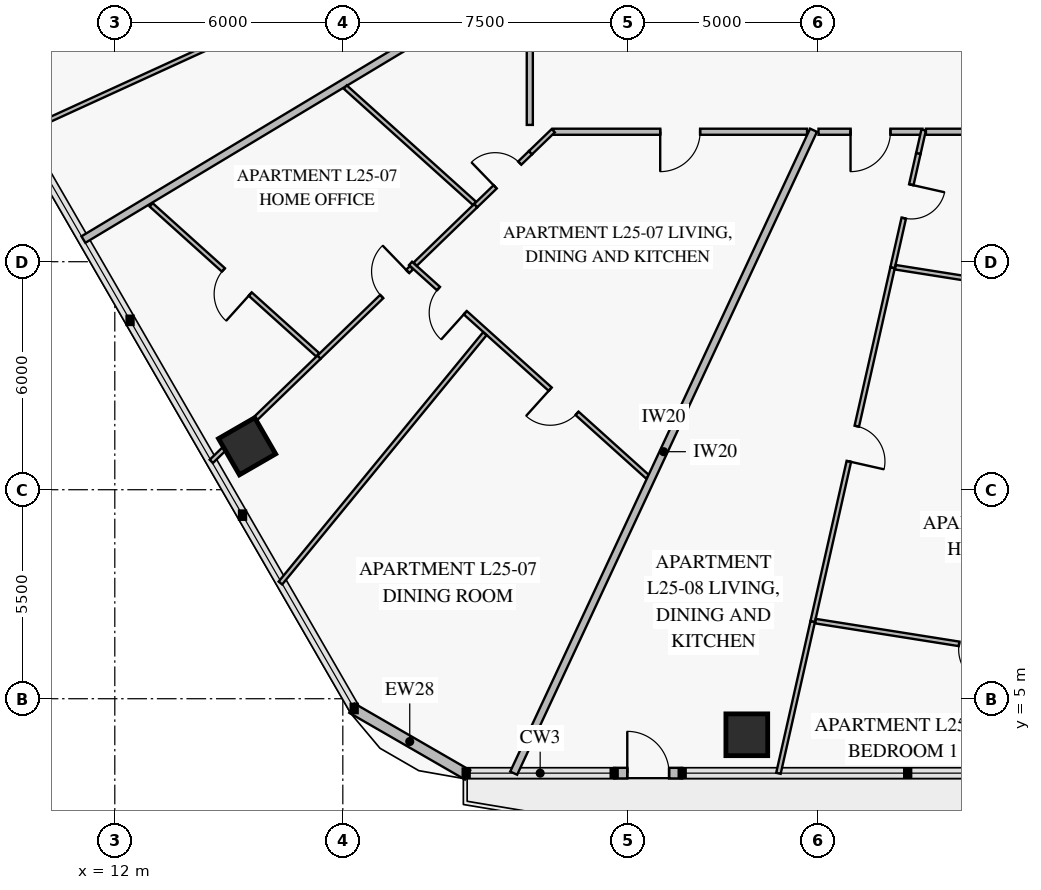
"""IFC4 building model, lengths in metres.
Left out: names, types, materials, properties, quantities, classifications, styles, units other than length and angle.
Written with IfcOpenShell. Run it as: python <this file> out.ifc"""

import sys

from ifc_helpers import new_model, si_unit, direction, frame, frame_2d, origin, origin_2d, place, context, subcontext, project, spatial, rectangle, extrude, element, fill, save


model = new_model("IFC4")
c1 = context("Model", 3, precision=1e-05, world=origin(), true_north=direction((0.0, 1.0)))
c2 = subcontext(c1, "Body", "Model", "MODEL_VIEW")
j1 = project(units=[si_unit("LENGTHUNIT", "METRE"), si_unit("PLANEANGLEUNIT", "RADIAN")], contexts=[c1])
p1 = place(None, origin())
s1 = spatial("IfcSite", under=j1, at=p1, CompositionType="ELEMENT")
p2 = place(p1, origin())
s2 = spatial("IfcBuilding", under=s1, at=p2, CompositionType="ELEMENT")
p3 = place(p2, frame((0.0, 0.0, 103.8)))
s3 = spatial("IfcBuildingStorey", under=s2, at=p3, CompositionType="ELEMENT", Elevation=103.8)
for number, where, z_axis, x_axis in (
    (1, (15.481, 11.643, 0.0), (0.0, 0.0, 1.0), (0.5, -0.866, 0.0)),
    (2, (28.63, 4.052, 0.0), (0.0, 0.0, 1.0), (1.0, 0.0, 0.0)),
):
    element("IfcColumn", number, at=place(p3, frame(where, z_axis=z_axis, x_axis=x_axis)), inside=s3, PredefinedType="COLUMN", context=c2, shape_type="SweptSolid", body=[
        extrude(rectangle(XDim=1.1, YDim=1.1, at=origin_2d()), origin(), (0.0, 0.0, 1.0), 3.55),
    ])
p4 = place(p3, frame((26.93, 3.042, 0.0), z_axis=(0.0, 0.0, 1.0), x_axis=(-1.0, 0.0, 0.0)))
e3 = element("IfcWall", 3, at=p4, inside=s3, PredefinedType="SOLIDWALL", context=c2, shape_type="SweptSolid", body=[
    extrude(rectangle(XDim=1.79, YDim=0.28, at=frame_2d((0.895, 0.0))), origin(), (0.0, 0.0, 1.0), 3.55),
])
p5 = place(p4, frame((0.345, 0.0, 0.0)))
e4 = element("IfcOpeningElement", 4, at=p5, cuts=e3, PredefinedType="OPENING", context=c2, shape_type="SweptSolid", body=[
    extrude(rectangle(XDim=1.1, YDim=2.2, at=frame_2d((0.55, 1.1))), frame((0.0, 0.152, 0.0), z_axis=(0.0, -1.0, 0.0), x_axis=(1.0, 0.0, 0.0)), (0.0, 0.0, 1.0), 0.304),
])
p6 = place(p3, frame((21.283, 2.994, 0.0), z_axis=(0.0, 0.0, 1.0), x_axis=(-0.866007452331, 0.500031091541, 0.0)))
e5 = element("IfcWall", 5, at=p6, inside=s3, PredefinedType="SOLIDWALL", context=c2, shape_type="SweptSolid", body=[
    extrude(rectangle(XDim=3.515, YDim=0.28, at=frame_2d((1.757, 0.0))), origin(), (0.0, 0.0, 1.0), 3.55),
])
p7 = place(p3, frame((19.781, 16.455, 0.0), z_axis=(0.0, 0.0, 1.0), x_axis=(0.743143681273, -0.669131877125, 0.0)))
e6 = element("IfcWall", 6, at=p7, inside=s3, PredefinedType="PARTITIONING", context=c2, shape_type="SweptSolid", body=[
    extrude(rectangle(XDim=8.392, YDim=0.12, at=frame_2d((4.196, 0.0))), origin(), (0.0, 0.0, 1.0), 2.85),
])
p8 = place(p7, frame((0.989, 0.0, 0.0)))
e7 = element("IfcOpeningElement", 7, at=p8, cuts=e6, PredefinedType="OPENING", context=c2, shape_type="SweptSolid", body=[
    extrude(rectangle(XDim=0.95, YDim=2.1, at=frame_2d((0.475, 1.05))), frame((0.0, 0.072, 0.0), z_axis=(0.0, -1.0, 0.0), x_axis=(1.0, 0.0, 0.0)), (0.0, 0.0, 1.0), 0.144),
])
p9 = place(p7, frame((4.945, 0.0, 0.0)))
e8 = element("IfcOpeningElement", 8, at=p9, cuts=e6, PredefinedType="OPENING", context=c2, shape_type="SweptSolid", body=[
    extrude(rectangle(XDim=0.95, YDim=2.1, at=frame_2d((0.475, 1.05))), frame((0.0, 0.072, 0.0), z_axis=(0.0, -1.0, 0.0), x_axis=(1.0, 0.0, 0.0)), (0.0, 0.0, 1.0), 0.144),
])
p10 = place(p3, frame((22.938, 19.368, 0.0), z_axis=(0.0, 0.0, 1.0), x_axis=(-0.718812006411, -0.695204501884, 0.0)))
e9 = element("IfcWall", 9, at=p10, inside=s3, PredefinedType="PARTITIONING", context=c2, shape_type="SweptSolid", body=[
    extrude(rectangle(XDim=2.006, YDim=0.12, at=frame_2d((1.003, 0.0))), origin(), (0.0, 0.0, 1.0), 3.55),
])
p11 = place(p10, frame((0.393, 0.0, 0.0)))
e10 = element("IfcOpeningElement", 10, at=p11, cuts=e9, PredefinedType="OPENING", context=c2, shape_type="SweptSolid", body=[
    extrude(rectangle(XDim=0.9, YDim=2.1, at=frame_2d((0.45, 1.05))), frame((0.0, 0.072, 0.0), z_axis=(0.0, -1.0, 0.0), x_axis=(1.0, 0.0, 0.0)), (0.0, 0.0, 1.0), 0.144),
])
p12 = place(p3, frame((21.496, 17.974, 0.0), z_axis=(0.0, 0.0, 1.0), x_axis=(-0.718868898455, -0.695145673103, 0.0)))
e11 = element("IfcWall", 11, at=p12, inside=s3, PredefinedType="PARTITIONING", context=c2, shape_type="SweptSolid", body=[
    extrude(rectangle(XDim=2.213, YDim=0.12, at=frame_2d((1.106, 0.0))), origin(), (0.0, 0.0, 1.0), 3.1),
])
p13 = place(p3, frame((19.807, 16.341, 0.0), z_axis=(0.0, 0.0, 1.0), x_axis=(-0.718831046799, -0.69518481439, 0.0)))
e12 = element("IfcWall", 12, at=p13, inside=s3, PredefinedType="PARTITIONING", context=c2, shape_type="SweptSolid", body=[
    extrude(rectangle(XDim=3.386, YDim=0.12, at=frame_2d((1.693, 0.0))), origin(), (0.0, 0.0, 1.0), 3.55),
])
p14 = place(p13, frame((0.14, 0.0, 0.0)))
e13 = element("IfcOpeningElement", 13, at=p14, cuts=e12, PredefinedType="OPENING", context=c2, shape_type="SweptSolid", body=[
    extrude(rectangle(XDim=0.95, YDim=2.1, at=frame_2d((0.475, 1.05))), frame((0.0, 0.072, 0.0), z_axis=(0.0, -1.0, 0.0), x_axis=(1.0, 0.0, 0.0)), (0.0, 0.0, 1.0), 0.144),
])
p15 = place(p3, frame((12.957, 17.996, 0.0), z_axis=(0.0, 0.0, 1.0), x_axis=(0.743162407379, -0.669111079163, 0.0)))
e14 = element("IfcWall", 14, at=p15, inside=s3, PredefinedType="PARTITIONING", context=c2, shape_type="SweptSolid", body=[
    extrude(rectangle(XDim=5.898, YDim=0.12, at=frame_2d((2.949, 0.0))), origin(), (0.0, 0.0, 1.0), 3.55),
])
p16 = place(p15, frame((2.558, 0.0, 0.0)))
e15 = element("IfcOpeningElement", 15, at=p16, cuts=e14, PredefinedType="OPENING", context=c2, shape_type="SweptSolid", body=[
    extrude(rectangle(XDim=0.95, YDim=2.1, at=frame_2d((0.475, 1.05))), frame((0.0, 0.072, 0.0), z_axis=(0.0, -1.0, 0.0), x_axis=(1.0, 0.0, 0.0)), (0.0, 0.0, 1.0), 0.144),
])
p17 = place(p3, frame((23.537, 19.92, 0.0), z_axis=(0.0, 0.0, 1.0), x_axis=(1.0, 0.0, 0.0)))
e16 = element("IfcWall", 16, at=p17, inside=s3, PredefinedType="PARTITIONING", context=c2, shape_type="SweptSolid", body=[
    extrude(rectangle(XDim=6.679, YDim=0.16, at=frame_2d((3.339, 0.0))), origin(), (0.0, 0.0, 1.0), 2.85),
])
p18 = place(p17, frame((2.814, 0.0, 0.0)))
e17 = element("IfcOpeningElement", 17, at=p18, cuts=e16, PredefinedType="OPENING", context=c2, shape_type="SweptSolid", body=[
    extrude(rectangle(XDim=1.05, YDim=2.15, at=frame_2d((0.525, 1.075))), frame((0.0, 0.092, 0.0), z_axis=(0.0, -1.0, 0.0), x_axis=(1.0, 0.0, 0.0)), (0.0, 0.0, 1.0), 0.184),
])
p19 = place(p3, frame((33.145, 19.35, 0.0), z_axis=(0.0, 0.0, 1.0), x_axis=(-0.220163710026, -0.975462936655, 0.0)))
e18 = element("IfcWall", 18, at=p19, inside=s3, PredefinedType="PARTITIONING", context=c2, shape_type="SweptSolid", body=[
    extrude(rectangle(XDim=3.085, YDim=0.12, at=frame_2d((1.542, 0.0))), origin(), (0.0, 0.0, 1.0), 3.55),
])
p20 = place(p19, frame((0.846, 0.0, 0.0)))
e19 = element("IfcOpeningElement", 19, at=p20, cuts=e18, PredefinedType="OPENING", context=c2, shape_type="SweptSolid", body=[
    extrude(rectangle(XDim=0.9, YDim=2.1, at=frame_2d((0.45, 1.05))), frame((0.0, 0.072, 0.0), z_axis=(0.0, -1.0, 0.0), x_axis=(1.0, 0.0, 0.0)), (0.0, 0.0, 1.0), 0.144),
])
p21 = place(p3, frame((32.465, 16.341, 0.0), z_axis=(0.0, 0.0, 1.0), x_axis=(-0.220183949045, -0.975458368452, 0.0)))
e20 = element("IfcWall", 20, at=p21, inside=s3, PredefinedType="PARTITIONING", context=c2, shape_type="SweptSolid", body=[
    extrude(rectangle(XDim=9.547, YDim=0.12, at=frame_2d((4.773, 0.0))), origin(), (0.0, 0.0, 1.0), 3.1),
])
p22 = place(p21, frame((4.273, 0.0, 0.0)))
e21 = element("IfcOpeningElement", 21, at=p22, cuts=e20, PredefinedType="OPENING", context=c2, shape_type="SweptSolid", body=[
    extrude(rectangle(XDim=0.95, YDim=2.1, at=frame_2d((0.475, 1.05))), frame((0.0, 0.072, 0.0), z_axis=(0.0, -1.0, 0.0), x_axis=(1.0, 0.0, 0.0)), (0.0, 0.0, 1.0), 0.144),
])
p23 = place(p3, frame((30.436, 7.042, 0.0), z_axis=(0.0, 0.0, 1.0), x_axis=(0.987688614877, -0.156432733283, 0.0)))
e22 = element("IfcWall", 22, at=p23, inside=s3, PredefinedType="PARTITIONING", context=c2, shape_type="SweptSolid", body=[
    extrude(rectangle(XDim=8.772, YDim=0.12, at=frame_2d((4.386, 0.0))), origin(), (0.0, 0.0, 1.0), 3.55),
])
p24 = place(p23, frame((3.827, 0.0, 0.0)))
e23 = element("IfcOpeningElement", 23, at=p24, cuts=e22, PredefinedType="OPENING", context=c2, shape_type="SweptSolid", body=[
    extrude(rectangle(XDim=0.95, YDim=2.1, at=frame_2d((0.475, 1.05))), frame((0.0, 0.072, 0.0), z_axis=(0.0, -1.0, 0.0), x_axis=(1.0, 0.0, 0.0)), (0.0, 0.0, 1.0), 0.144),
])
p25 = place(p3, frame((30.517, 19.92, 0.0), z_axis=(0.0, 0.0, 1.0), x_axis=(1.0, 0.0, 0.0)))
e24 = element("IfcWall", 24, at=p25, inside=s3, PredefinedType="PARTITIONING", context=c2, shape_type="SweptSolid", body=[
    extrude(rectangle(XDim=2.736, YDim=0.16, at=frame_2d((1.368, 0.0))), origin(), (0.0, 0.0, 1.0), 2.85),
])
p26 = place(p25, frame((0.843, 0.0, 0.0)))
e25 = element("IfcOpeningElement", 25, at=p26, cuts=e24, PredefinedType="OPENING", context=c2, shape_type="SweptSolid", body=[
    extrude(rectangle(XDim=1.05, YDim=2.15, at=frame_2d((0.525, 1.075))), frame((0.0, 0.092, 0.0), z_axis=(0.0, -1.0, 0.0), x_axis=(1.0, 0.0, 0.0)), (0.0, 0.0, 1.0), 0.184),
])
p27 = place(p3, frame((19.35, 24.384, 0.0), z_axis=(0.0, 0.0, 1.0), x_axis=(-0.909372754927, -0.415982202259, 0.0)))
e26 = element("IfcWall", 26, at=p27, inside=s3, PredefinedType="PARTITIONING", context=c2, shape_type="SweptSolid", body=[
    extrude(rectangle(XDim=10.79, YDim=0.12, at=frame_2d((5.395, 0.0))), origin(), (0.0, 0.0, 1.0), 2.8),
])
p28 = place(p3, frame((22.96, 24.165, 0.0), z_axis=(0.0, 0.0, 1.0), x_axis=(-0.857163744899, -0.515043992714, 0.0)))
e27 = element("IfcWall", 27, at=p28, inside=s3, PredefinedType="PARTITIONING", context=c2, shape_type="SweptSolid", body=[
    extrude(rectangle(XDim=13.75, YDim=0.2, at=frame_2d((6.875, 0.0))), origin(), (0.0, 0.0, 1.0), 2.8),
])
p29 = place(p3, frame((21.736, 14.604, 0.0), z_axis=(0.0, 0.0, 1.0), x_axis=(-0.634046199825, -0.773295167765, 0.0)))
e28 = element("IfcWall", 28, at=p29, inside=s3, PredefinedType="PARTITIONING", context=c2, shape_type="SweptSolid", body=[
    extrude(rectangle(XDim=8.482, YDim=0.12, at=frame_2d((4.241, 0.0))), origin(), (0.0, 0.0, 1.0), 2.8),
])
p30 = place(p3, frame((23.537, 19.948, 0.0), z_axis=(0.0, 0.0, 1.0), x_axis=(-0.719012767995, -0.694996862914, 0.0)))
e29 = element("IfcWall", 29, at=p30, inside=s3, PredefinedType="PARTITIONING", context=c2, shape_type="SweptSolid", body=[
    extrude(rectangle(XDim=0.833, YDim=0.12, at=frame_2d((0.417, 0.0))), origin(), (0.0, 0.0, 1.0), 2.85),
])
p31 = place(p3, frame((17.373, 13.987, 0.0), z_axis=(0.0, 0.0, 1.0), x_axis=(-0.718827348766, -0.695188638189, 0.0)))
e30 = element("IfcWall", 30, at=p31, inside=s3, PredefinedType="PARTITIONING", context=c2, shape_type="SweptSolid", body=[
    extrude(rectangle(XDim=2.551, YDim=0.12, at=frame_2d((1.275, 0.0))), origin(), (0.0, 0.0, 1.0), 3.55),
])
p32 = place(p3, frame((14.911, 11.606, 0.0), z_axis=(0.0, 0.0, 1.0), x_axis=(-0.718799796591, -0.695217126099, 0.0)))
e31 = element("IfcWall", 31, at=p32, inside=s3, PredefinedType="PARTITIONING", context=c2, shape_type="SweptSolid", body=[
    extrude(rectangle(XDim=0.518, YDim=0.12, at=frame_2d((0.259, 0.0))), origin(), (0.0, 0.0, 1.0), 3.55),
])
p33 = place(p3, frame((18.064, 21.097, 0.0), z_axis=(0.0, 0.0, 1.0), x_axis=(0.743156109258, -0.669118074238, 0.0)))
e32 = element("IfcWall", 32, at=p33, inside=s3, PredefinedType="PARTITIONING", context=c2, shape_type="SweptSolid", body=[
    extrude(rectangle(XDim=4.574, YDim=0.12, at=frame_2d((2.287, 0.0))), origin(), (0.0, 0.0, 1.0), 3.1),
])
p34 = place(p3, frame((30.386, 19.96, 0.0), z_axis=(0.0, 0.0, 1.0), x_axis=(-0.422626983595, -0.906303719918, 0.0)))
e33 = element("IfcWall", 33, at=p34, inside=s3, PredefinedType="PARTITIONING", context=c2, shape_type="SweptSolid", body=[
    extrude(rectangle(XDim=18.667, YDim=0.2, at=frame_2d((9.334, 0.0))), origin(), (0.0, 0.0, 1.0), 2.8),
])
p35 = place(p3, frame((33.283, 19.965, 0.0), z_axis=(0.0, 0.0, 1.0), x_axis=(-0.220332181963, -0.975424896951, 0.0)))
e34 = element("IfcWall", 34, at=p35, inside=s3, PredefinedType="PARTITIONING", context=c2, shape_type="SweptSolid", body=[
    extrude(rectangle(XDim=0.63, YDim=0.12, at=frame_2d((0.315, 0.0))), origin(), (0.0, 0.0, 1.0), 3.55),
])
p36 = place(p3, frame((30.363, 7.028, 0.0), z_axis=(0.0, 0.0, 1.0), x_axis=(-0.220176625834, -0.975460021444, 0.0)))
e35 = element("IfcWall", 35, at=p36, inside=s3, PredefinedType="PARTITIONING", context=c2, shape_type="SweptSolid", body=[
    extrude(rectangle(XDim=4.092, YDim=0.12, at=frame_2d((2.046, 0.0))), origin(), (0.0, 0.0, 1.0), 2.8),
])
p37 = place(p3, frame((32.538, 16.354, 0.0), z_axis=(0.0, 0.0, 1.0), x_axis=(0.987690664092, -0.156419794354, 0.0)))
e36 = element("IfcWall", 36, at=p37, inside=s3, PredefinedType="PARTITIONING", context=c2, shape_type="SweptSolid", body=[
    extrude(rectangle(XDim=5.511, YDim=0.12, at=frame_2d((2.756, 0.0))), origin(), (0.0, 0.0, 1.0), 3.55),
])
p38 = place(p3, frame((22.92, 23.961, 0.0), z_axis=(0.0, 0.0, 1.0), x_axis=(0.0, -1.0, 0.0)))
e37 = element("IfcWall", 37, at=p38, inside=s3, PredefinedType="PARTITIONING", context=c2, shape_type="SweptSolid", body=[
    extrude(rectangle(XDim=3.861, YDim=0.16, at=frame_2d((1.931, 0.0))), origin(), (0.0, 0.0, 1.0), 3.55),
])
p39 = place(p3, frame((33.343, 19.92, 0.0), z_axis=(0.0, 0.0, 1.0), x_axis=(1.0, 0.0, 0.0)))
e38 = element("IfcWall", 38, at=p39, inside=s3, PredefinedType="PARTITIONING", context=c2, shape_type="SweptSolid", body=[
    extrude(rectangle(XDim=4.013, YDim=0.16, at=frame_2d((2.007, 0.0))), origin(), (0.0, 0.0, 1.0), 3.55),
])
p40 = place(p5, frame((1.1, 0.0, 0.0), z_axis=(0.0, 0.0, 1.0), x_axis=(-1.0, 0.0, 0.0)))
e39 = element("IfcDoor", 39, at=p40, inside=s3, OperationType="SINGLE_SWING_LEFT", PredefinedType="DOOR", context=c2, shape_type="SweptSolid", body=[
    extrude(rectangle(XDim=1.1, YDim=2.2, at=frame_2d((0.55, 1.1))), frame((0.0, 0.025, 0.0), z_axis=(0.0, -1.0, 0.0), x_axis=(1.0, 0.0, 0.0)), (0.0, 0.0, 1.0), 0.05),
])
fill(e4, e39)
p41 = place(p8, frame((0.95, 0.0, 0.0), z_axis=(0.0, 0.0, 1.0), x_axis=(-1.0, 0.0, 0.0)))
e40 = element("IfcDoor", 40, at=p41, inside=s3, OperationType="SINGLE_SWING_LEFT", PredefinedType="DOOR", context=c2, shape_type="SweptSolid", body=[
    extrude(rectangle(XDim=0.95, YDim=2.1, at=frame_2d((0.475, 1.05))), frame((0.0, 0.025, 0.0), z_axis=(0.0, -1.0, 0.0), x_axis=(1.0, 0.0, 0.0)), (0.0, 0.0, 1.0), 0.05),
])
fill(e7, e40)
p42 = place(p9, frame((0.95, 0.0, 0.0), z_axis=(0.0, 0.0, 1.0), x_axis=(-1.0, 0.0, 0.0)))
e41 = element("IfcDoor", 41, at=p42, inside=s3, OperationType="SINGLE_SWING_RIGHT", PredefinedType="DOOR", context=c2, shape_type="SweptSolid", body=[
    extrude(rectangle(XDim=0.95, YDim=2.1, at=frame_2d((0.475, 1.05))), frame((0.0, 0.025, 0.0), z_axis=(0.0, -1.0, 0.0), x_axis=(1.0, 0.0, 0.0)), (0.0, 0.0, 1.0), 0.05),
])
fill(e8, e41)
p43 = place(p11, frame((0.9, 0.0, 0.0), z_axis=(0.0, 0.0, 1.0), x_axis=(-1.0, 0.0, 0.0)))
e42 = element("IfcDoor", 42, at=p43, inside=s3, OperationType="SINGLE_SWING_LEFT", PredefinedType="DOOR", context=c2, shape_type="SweptSolid", body=[
    extrude(rectangle(XDim=0.9, YDim=2.1, at=frame_2d((0.45, 1.05))), frame((0.0, 0.025, 0.0), z_axis=(0.0, -1.0, 0.0), x_axis=(1.0, 0.0, 0.0)), (0.0, 0.0, 1.0), 0.05),
])
fill(e10, e42)
p44 = place(p14, frame((0.95, 0.0, 0.0), z_axis=(0.0, 0.0, 1.0), x_axis=(-1.0, 0.0, 0.0)))
e43 = element("IfcDoor", 43, at=p44, inside=s3, OperationType="SINGLE_SWING_RIGHT", PredefinedType="DOOR", context=c2, shape_type="SweptSolid", body=[
    extrude(rectangle(XDim=0.95, YDim=2.1, at=frame_2d((0.475, 1.05))), frame((0.0, 0.025, 0.0), z_axis=(0.0, -1.0, 0.0), x_axis=(1.0, 0.0, 0.0)), (0.0, 0.0, 1.0), 0.05),
])
fill(e13, e43)
p45 = place(p16, frame((0.95, 0.0, 0.0), z_axis=(0.0, 0.0, 1.0), x_axis=(-1.0, 0.0, 0.0)))
e44 = element("IfcDoor", 44, at=p45, inside=s3, OperationType="SINGLE_SWING_LEFT", PredefinedType="DOOR", context=c2, shape_type="SweptSolid", body=[
    extrude(rectangle(XDim=0.95, YDim=2.1, at=frame_2d((0.475, 1.05))), frame((0.0, 0.025, 0.0), z_axis=(0.0, -1.0, 0.0), x_axis=(1.0, 0.0, 0.0)), (0.0, 0.0, 1.0), 0.05),
])
fill(e15, e44)
p46 = place(p18, frame((1.05, 0.0, 0.0), z_axis=(0.0, 0.0, 1.0), x_axis=(-1.0, 0.0, 0.0)))
e45 = element("IfcDoor", 45, at=p46, inside=s3, OperationType="SINGLE_SWING_RIGHT", PredefinedType="DOOR", context=c2, shape_type="SweptSolid", body=[
    extrude(rectangle(XDim=1.05, YDim=2.15, at=frame_2d((0.525, 1.075))), frame((0.0, 0.025, 0.0), z_axis=(0.0, -1.0, 0.0), x_axis=(1.0, 0.0, 0.0)), (0.0, 0.0, 1.0), 0.05),
])
fill(e17, e45)
p47 = place(p20, origin())
e46 = element("IfcDoor", 46, at=p47, inside=s3, OperationType="SINGLE_SWING_LEFT", PredefinedType="DOOR", context=c2, shape_type="SweptSolid", body=[
    extrude(rectangle(XDim=0.9, YDim=2.1, at=frame_2d((0.45, 1.05))), frame((0.0, 0.025, 0.0), z_axis=(0.0, -1.0, 0.0), x_axis=(1.0, 0.0, 0.0)), (0.0, 0.0, 1.0), 0.05),
])
fill(e19, e46)
p48 = place(p22, origin())
e47 = element("IfcDoor", 47, at=p48, inside=s3, OperationType="SINGLE_SWING_RIGHT", PredefinedType="DOOR", context=c2, shape_type="SweptSolid", body=[
    extrude(rectangle(XDim=0.95, YDim=2.1, at=frame_2d((0.475, 1.05))), frame((0.0, 0.025, 0.0), z_axis=(0.0, -1.0, 0.0), x_axis=(1.0, 0.0, 0.0)), (0.0, 0.0, 1.0), 0.05),
])
fill(e21, e47)
p49 = place(p24, frame((0.95, 0.0, 0.0), z_axis=(0.0, 0.0, 1.0), x_axis=(-1.0, 0.0, 0.0)))
e48 = element("IfcDoor", 48, at=p49, inside=s3, OperationType="SINGLE_SWING_LEFT", PredefinedType="DOOR", context=c2, shape_type="SweptSolid", body=[
    extrude(rectangle(XDim=0.95, YDim=2.1, at=frame_2d((0.475, 1.05))), frame((0.0, 0.025, 0.0), z_axis=(0.0, -1.0, 0.0), x_axis=(1.0, 0.0, 0.0)), (0.0, 0.0, 1.0), 0.05),
])
fill(e23, e48)
p50 = place(p26, frame((1.05, 0.0, 0.0), z_axis=(0.0, 0.0, 1.0), x_axis=(-1.0, 0.0, 0.0)))
e49 = element("IfcDoor", 49, at=p50, inside=s3, OperationType="SINGLE_SWING_RIGHT", PredefinedType="DOOR", context=c2, shape_type="SweptSolid", body=[
    extrude(rectangle(XDim=1.05, YDim=2.15, at=frame_2d((0.525, 1.075))), frame((0.0, 0.025, 0.0), z_axis=(0.0, -1.0, 0.0), x_axis=(1.0, 0.0, 0.0)), (0.0, 0.0, 1.0), 0.05),
])
fill(e25, e49)
save(model, sys.argv[1])
